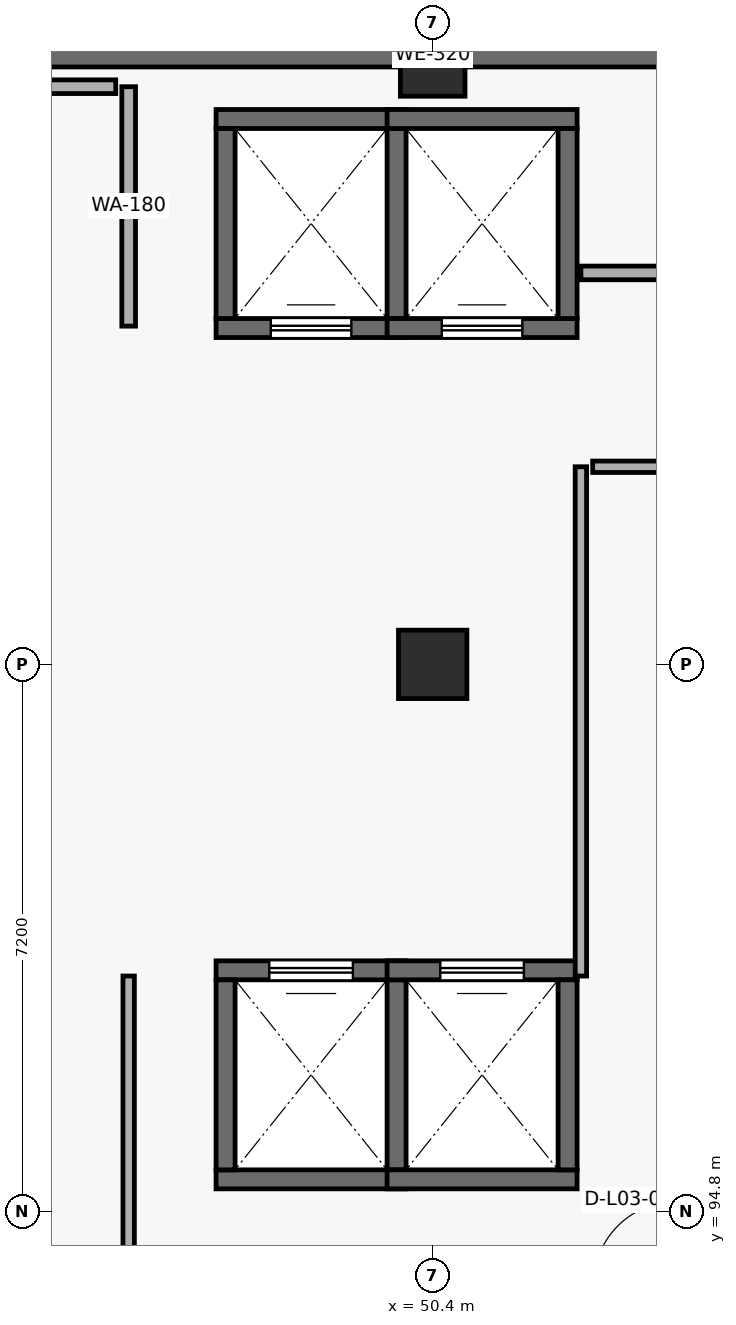
"""IFC4 building model, lengths in metres.
Left out: names, types, materials, properties, quantities, classifications, styles, units other than length and angle.
Written with IfcOpenShell. Run it as: python <this file> out.ifc"""

import sys

from ifc_helpers import new_model, si_unit, direction, frame, frame_2d, origin, origin_2d, place, context, subcontext, project, spatial, rectangle, extrude, element, fill, save


model = new_model("IFC4")
c1 = context("Model", 3, precision=1e-05, world=origin(), true_north=direction((0.0, 1.0)))
c2 = subcontext(c1, "Body", "Model", "MODEL_VIEW")
j1 = project(units=[si_unit("LENGTHUNIT", "METRE"), si_unit("PLANEANGLEUNIT", "RADIAN")], contexts=[c1])
p1 = place(None, origin())
s1 = spatial("IfcSite", under=j1, at=p1, CompositionType="ELEMENT")
p2 = place(p1, origin())
s2 = spatial("IfcBuilding", under=s1, at=p2, CompositionType="ELEMENT")
p3 = place(p2, frame((0.0, 0.0, 10.2)))
s3 = spatial("IfcBuildingStorey", under=s2, at=p3, CompositionType="ELEMENT", Elevation=10.2)
p4 = place(p3, frame((50.4, 102.0, 0.0), z_axis=(0.0, 0.0, 1.0), x_axis=(1.0, 0.0, 0.0)))
e1 = element("IfcColumn", 1, at=p4, inside=s3, PredefinedType="COLUMN", context=c2, shape_type="SweptSolid", body=[
    extrude(rectangle(XDim=0.9, YDim=0.9, at=origin_2d()), origin(), (0.0, 0.0, 1.0), 5.1),
])
p5 = place(p3, frame((50.4, 109.9, 0.0), z_axis=(0.0, 0.0, 1.0), x_axis=(1.0, 0.0, 0.0)))
e2 = element("IfcColumn", 2, at=p5, inside=s3, PredefinedType="COLUMN", context=c2, shape_type="SweptSolid", body=[
    extrude(rectangle(XDim=0.85, YDim=0.85, at=origin_2d()), origin(), (0.0, 0.0, 1.0), 5.1),
])
p6 = place(p3, frame((33.6, 110.02, 0.0), z_axis=(0.0, 0.0, 1.0), x_axis=(1.0, 0.0, 0.0)))
e3 = element("IfcWall", 3, at=p6, inside=s3, PredefinedType="SOLIDWALL", context=c2, shape_type="SweptSolid", body=[
    extrude(rectangle(XDim=33.6, YDim=0.32, at=frame_2d((16.8, 0.0))), origin(), (0.0, 0.0, 1.0), 4.82),
])
p7 = place(p3, frame((47.55, 95.225, 0.0), z_axis=(0.0, 0.0, 1.0), x_axis=(1.0, 0.0, 0.0)))
e4 = element("IfcWall", 4, at=p7, inside=s3, PredefinedType="SHEAR", context=c2, shape_type="SweptSolid", body=[
    extrude(rectangle(XDim=2.5, YDim=0.25, at=frame_2d((1.25, 0.0))), origin(), (0.0, 0.0, 1.0), 4.82),
])
p8 = place(p3, frame((50.05, 97.975, 0.0), z_axis=(0.0, 0.0, 1.0), x_axis=(-1.0, 0.0, 0.0)))
e5 = element("IfcWall", 5, at=p8, inside=s3, PredefinedType="SHEAR", context=c2, shape_type="SweptSolid", body=[
    extrude(rectangle(XDim=2.5, YDim=0.25, at=frame_2d((1.25, 0.0))), origin(), (0.0, 0.0, 1.0), 4.82),
])
p9 = place(p8, frame((0.7, 0.0, 0.0)))
e6 = element("IfcOpeningElement", 6, at=p9, cuts=e5, PredefinedType="OPENING", context=c2, shape_type="SweptSolid", body=[
    extrude(rectangle(XDim=1.1, YDim=2.2, at=frame_2d((0.55, 1.1))), frame((0.0, 0.135, 0.0), z_axis=(0.0, -1.0, 0.0), x_axis=(1.0, 0.0, 0.0)), (0.0, 0.0, 1.0), 0.27),
])
for number, where, z_axis, x_axis in (
    (7, (47.675, 95.35, 0.0), (0.0, 0.0, 1.0), (0.0, 1.0, 0.0)),
    (8, (49.925, 97.85, 0.0), (0.0, 0.0, 1.0), (0.0, -1.0, 0.0)),
    (9, (49.8, 95.225, 0.0), (0.0, 0.0, 1.0), (1.0, 0.0, 0.0)),
):
    element("IfcWall", number, at=place(p3, frame(where, z_axis=z_axis, x_axis=x_axis)), inside=s3, PredefinedType="SHEAR", context=c2, shape_type="SweptSolid", body=[
        extrude(rectangle(XDim=2.5, YDim=0.25, at=frame_2d((1.25, 0.0))), origin(), (0.0, 0.0, 1.0), 4.82),
    ])
p10 = place(p3, frame((52.3, 97.975, 0.0), z_axis=(0.0, 0.0, 1.0), x_axis=(-1.0, 0.0, 0.0)))
e10 = element("IfcWall", 10, at=p10, inside=s3, PredefinedType="SHEAR", context=c2, shape_type="SweptSolid", body=[
    extrude(rectangle(XDim=2.5, YDim=0.25, at=frame_2d((1.25, 0.0))), origin(), (0.0, 0.0, 1.0), 4.82),
])
p11 = place(p10, frame((0.7, 0.0, 0.0)))
e11 = element("IfcOpeningElement", 11, at=p11, cuts=e10, PredefinedType="OPENING", context=c2, shape_type="SweptSolid", body=[
    extrude(rectangle(XDim=1.1, YDim=2.2, at=frame_2d((0.55, 1.1))), frame((0.0, 0.135, 0.0), z_axis=(0.0, -1.0, 0.0), x_axis=(1.0, 0.0, 0.0)), (0.0, 0.0, 1.0), 0.27),
])
p12 = place(p3, frame((52.175, 97.85, 0.0), z_axis=(0.0, 0.0, 1.0), x_axis=(0.0, -1.0, 0.0)))
e12 = element("IfcWall", 12, at=p12, inside=s3, PredefinedType="SHEAR", context=c2, shape_type="SweptSolid", body=[
    extrude(rectangle(XDim=2.5, YDim=0.25, at=frame_2d((1.25, 0.0))), origin(), (0.0, 0.0, 1.0), 4.82),
])
p13 = place(p3, frame((47.55, 106.425, 0.0), z_axis=(0.0, 0.0, 1.0), x_axis=(1.0, 0.0, 0.0)))
e13 = element("IfcWall", 13, at=p13, inside=s3, PredefinedType="SHEAR", context=c2, shape_type="SweptSolid", body=[
    extrude(rectangle(XDim=2.5, YDim=0.25, at=frame_2d((1.25, 0.0))), origin(), (0.0, 0.0, 1.0), 4.82),
])
p14 = place(p13, frame((0.72, 0.0, 0.0)))
e14 = element("IfcOpeningElement", 14, at=p14, cuts=e13, PredefinedType="OPENING", context=c2, shape_type="SweptSolid", body=[
    extrude(rectangle(XDim=1.06, YDim=2.2, at=frame_2d((0.53, 1.1))), frame((0.0, 0.135, 0.0), z_axis=(0.0, -1.0, 0.0), x_axis=(1.0, 0.0, 0.0)), (0.0, 0.0, 1.0), 0.27),
])
for number, where, z_axis, x_axis in (
    (15, (50.05, 109.175, 0.0), (0.0, 0.0, 1.0), (-1.0, 0.0, 0.0)),
    (16, (47.675, 106.55, 0.0), (0.0, 0.0, 1.0), (0.0, 1.0, 0.0)),
    (17, (49.925, 109.05, 0.0), (0.0, 0.0, 1.0), (0.0, -1.0, 0.0)),
):
    element("IfcWall", number, at=place(p3, frame(where, z_axis=z_axis, x_axis=x_axis)), inside=s3, PredefinedType="SHEAR", context=c2, shape_type="SweptSolid", body=[
        extrude(rectangle(XDim=2.5, YDim=0.25, at=frame_2d((1.25, 0.0))), origin(), (0.0, 0.0, 1.0), 4.82),
    ])
p15 = place(p3, frame((49.8, 106.425, 0.0), z_axis=(0.0, 0.0, 1.0), x_axis=(1.0, 0.0, 0.0)))
e18 = element("IfcWall", 18, at=p15, inside=s3, PredefinedType="SHEAR", context=c2, shape_type="SweptSolid", body=[
    extrude(rectangle(XDim=2.5, YDim=0.25, at=frame_2d((1.25, 0.0))), origin(), (0.0, 0.0, 1.0), 4.82),
])
p16 = place(p15, frame((0.72, 0.0, 0.0)))
e19 = element("IfcOpeningElement", 19, at=p16, cuts=e18, PredefinedType="OPENING", context=c2, shape_type="SweptSolid", body=[
    extrude(rectangle(XDim=1.06, YDim=2.2, at=frame_2d((0.53, 1.1))), frame((0.0, 0.135, 0.0), z_axis=(0.0, -1.0, 0.0), x_axis=(1.0, 0.0, 0.0)), (0.0, 0.0, 1.0), 0.27),
])
for number, where, z_axis, x_axis in (
    (20, (52.3, 109.175, 0.0), (0.0, 0.0, 1.0), (-1.0, 0.0, 0.0)),
    (21, (52.175, 109.05, 0.0), (0.0, 0.0, 1.0), (0.0, -1.0, 0.0)),
):
    element("IfcWall", number, at=place(p3, frame(where, z_axis=z_axis, x_axis=x_axis)), inside=s3, PredefinedType="SHEAR", context=c2, shape_type="SweptSolid", body=[
        extrude(rectangle(XDim=2.5, YDim=0.25, at=frame_2d((1.25, 0.0))), origin(), (0.0, 0.0, 1.0), 4.82),
    ])
p17 = place(p3, frame((64.35, 107.15, 0.0), z_axis=(0.0, 0.0, 1.0), x_axis=(-1.0, 0.0, 0.0)))
e22 = element("IfcWall", 22, at=p17, inside=s3, PredefinedType="PARTITIONING", context=c2, shape_type="SweptSolid", body=[
    extrude(rectangle(XDim=12.0, YDim=0.18, at=frame_2d((6.0, 0.0))), origin(), (0.0, 0.0, 1.0), 4.82),
])
p18 = place(p3, frame((52.35, 97.9, 0.0), z_axis=(0.0, 0.0, 1.0), x_axis=(0.0, 1.0, 0.0)))
e23 = element("IfcWall", 23, at=p18, inside=s3, PredefinedType="PARTITIONING", context=c2, shape_type="SweptSolid", body=[
    extrude(rectangle(XDim=6.7, YDim=0.15, at=frame_2d((3.35, 0.0))), origin(), (0.0, 0.0, 1.0), 4.82),
])
p19 = place(p3, frame((46.4, 94.005, 0.0), z_axis=(0.0, 0.0, 1.0), x_axis=(0.0, 1.0, 0.0)))
e24 = element("IfcWall", 24, at=p19, inside=s3, PredefinedType="PARTITIONING", context=c2, shape_type="SweptSolid", body=[
    extrude(rectangle(XDim=3.895, YDim=0.15, at=frame_2d((1.948, 0.0))), origin(), (0.0, 0.0, 1.0), 4.82),
])
p20 = place(p3, frame((46.4, 106.45, 0.0), z_axis=(0.0, 0.0, 1.0), x_axis=(0.0, 1.0, 0.0)))
e25 = element("IfcWall", 25, at=p20, inside=s3, PredefinedType="PARTITIONING", context=c2, shape_type="SweptSolid", body=[
    extrude(rectangle(XDim=3.15, YDim=0.18, at=frame_2d((1.575, 0.0))), origin(), (0.0, 0.0, 1.0), 4.82),
])
p21 = place(p3, frame((52.505, 104.6, 0.0), z_axis=(0.0, 0.0, 1.0), x_axis=(1.0, 0.0, 0.0)))
e26 = element("IfcWall", 26, at=p21, inside=s3, PredefinedType="PARTITIONING", context=c2, shape_type="SweptSolid", body=[
    extrude(rectangle(XDim=2.575, YDim=0.15, at=frame_2d((1.288, 0.0))), origin(), (0.0, 0.0, 1.0), 4.82),
])
p22 = place(p3, frame((46.23, 109.6, 0.0), z_axis=(0.0, 0.0, 1.0), x_axis=(-1.0, 0.0, 0.0)))
e27 = element("IfcWall", 27, at=p22, inside=s3, PredefinedType="PARTITIONING", context=c2, shape_type="SweptSolid", body=[
    extrude(rectangle(XDim=1.895, YDim=0.18, at=frame_2d((0.948, 0.0))), origin(), (0.0, 0.0, 1.0), 3.9),
])
p23 = place(p9, origin())
e28 = element("IfcDoor", 28, at=p23, inside=s3, OperationType="SLIDING_TO_RIGHT", PredefinedType="DOOR", context=c2, shape_type="SweptSolid", body=[
    extrude(rectangle(XDim=1.1, YDim=2.2, at=frame_2d((0.55, 1.1))), frame((0.0, 0.025, 0.0), z_axis=(0.0, -1.0, 0.0), x_axis=(1.0, 0.0, 0.0)), (0.0, 0.0, 1.0), 0.05),
])
fill(e6, e28)
p24 = place(p11, origin())
e29 = element("IfcDoor", 29, at=p24, inside=s3, OperationType="SLIDING_TO_RIGHT", PredefinedType="DOOR", context=c2, shape_type="SweptSolid", body=[
    extrude(rectangle(XDim=1.1, YDim=2.2, at=frame_2d((0.55, 1.1))), frame((0.0, 0.025, 0.0), z_axis=(0.0, -1.0, 0.0), x_axis=(1.0, 0.0, 0.0)), (0.0, 0.0, 1.0), 0.05),
])
fill(e11, e29)
p25 = place(p14, origin())
e30 = element("IfcDoor", 30, at=p25, inside=s3, OperationType="SLIDING_TO_RIGHT", PredefinedType="DOOR", context=c2, shape_type="SweptSolid", body=[
    extrude(rectangle(XDim=1.06, YDim=2.2, at=frame_2d((0.53, 1.1))), frame((0.0, 0.025, 0.0), z_axis=(0.0, -1.0, 0.0), x_axis=(1.0, 0.0, 0.0)), (0.0, 0.0, 1.0), 0.05),
])
fill(e14, e30)
p26 = place(p16, origin())
e31 = element("IfcDoor", 31, at=p26, inside=s3, OperationType="SLIDING_TO_RIGHT", PredefinedType="DOOR", context=c2, shape_type="SweptSolid", body=[
    extrude(rectangle(XDim=1.06, YDim=2.2, at=frame_2d((0.53, 1.1))), frame((0.0, 0.025, 0.0), z_axis=(0.0, -1.0, 0.0), x_axis=(1.0, 0.0, 0.0)), (0.0, 0.0, 1.0), 0.05),
])
fill(e19, e31)
save(model, sys.argv[1])
